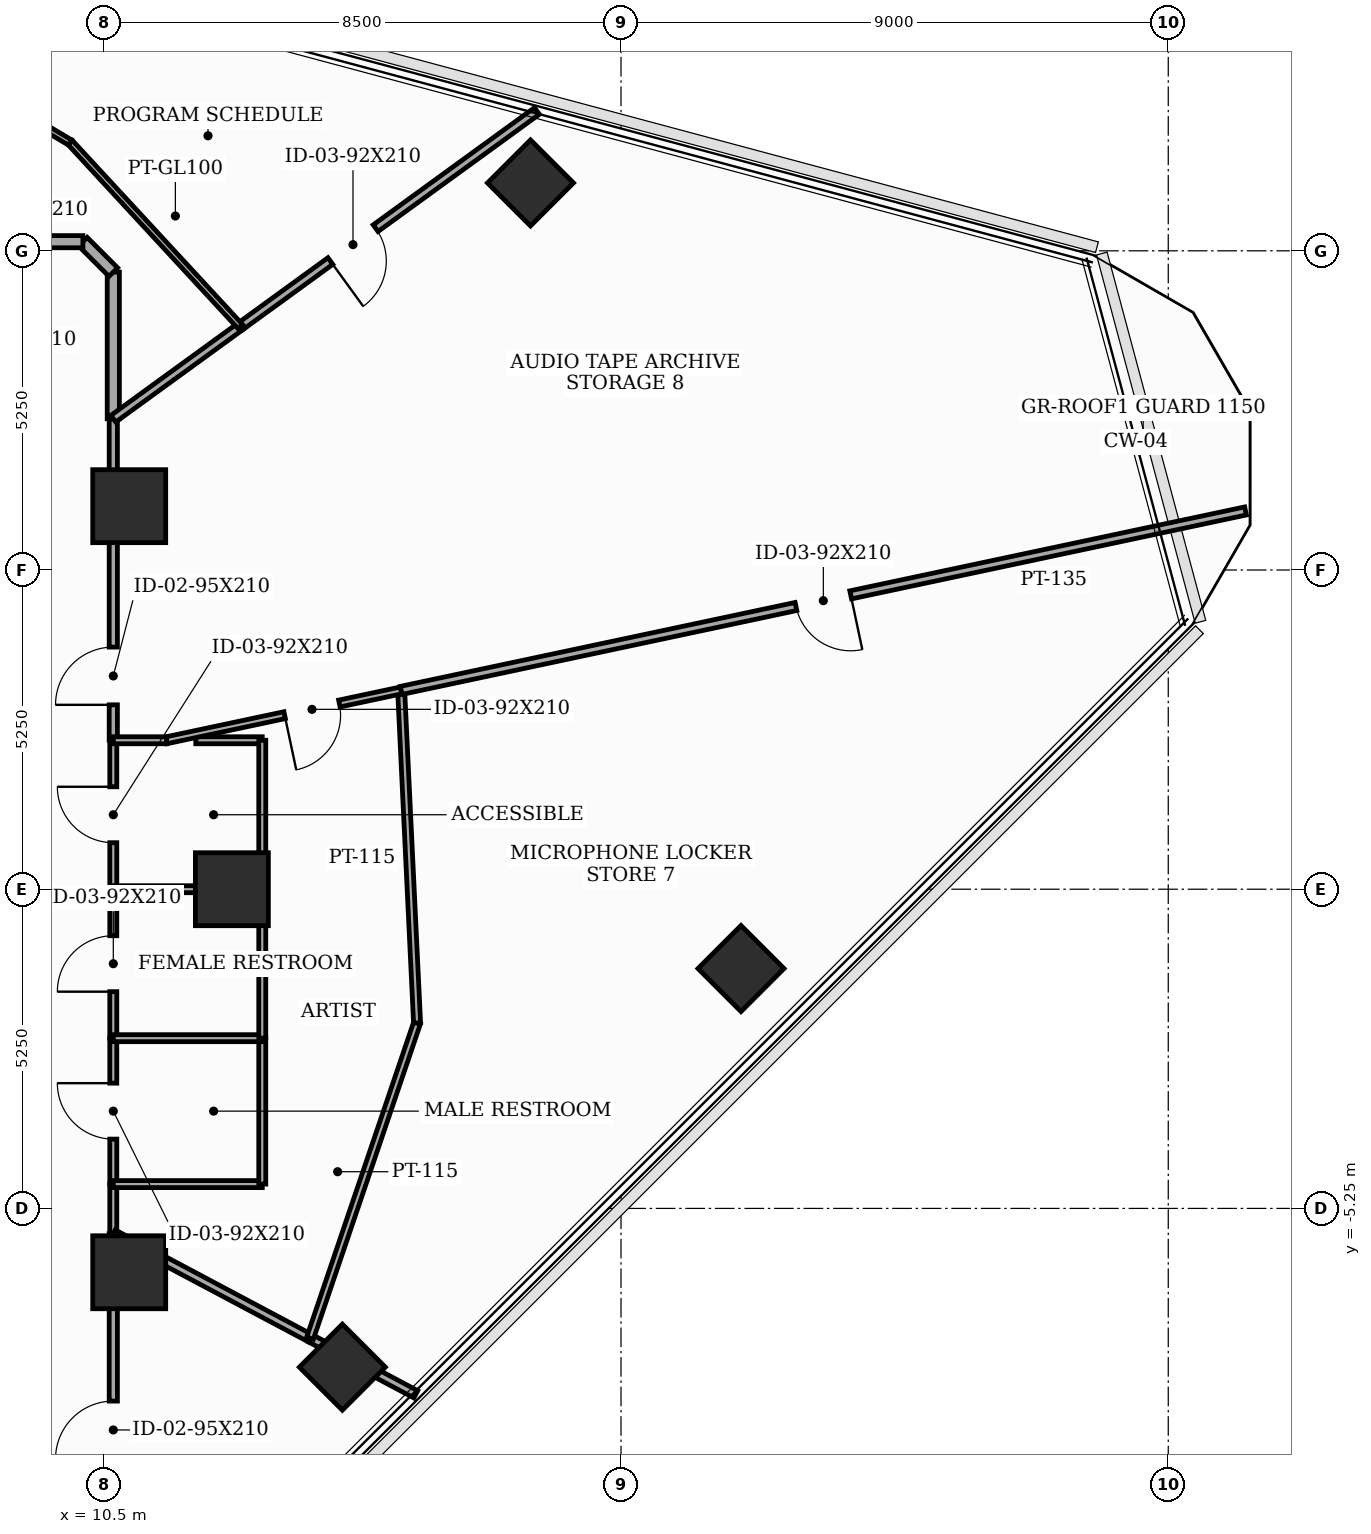
"""IFC4 building model, lengths in metres.
Left out: names, types, materials, properties, quantities, classifications, styles, units other than length and angle.
Written with IfcOpenShell. Run it as: python <this file> out.ifc"""

import sys

from ifc_helpers import new_model, si_unit, direction, frame, frame_2d, origin, origin_2d, place, context, subcontext, project, spatial, rectangle, extrude, element, fill, save


model = new_model("IFC4")
c1 = context("Model", 3, precision=1e-05, world=origin(), true_north=direction((0.0, 1.0)))
c2 = subcontext(c1, "Body", "Model", "MODEL_VIEW")
j1 = project(units=[si_unit("LENGTHUNIT", "METRE"), si_unit("PLANEANGLEUNIT", "RADIAN")], contexts=[c1])
p1 = place(None, origin())
s1 = spatial("IfcSite", under=j1, at=p1, CompositionType="ELEMENT")
p2 = place(p1, origin())
s2 = spatial("IfcBuilding", under=s1, at=p2, CompositionType="ELEMENT")
p3 = place(p2, frame((0.0, 0.0, 184.2)))
s3 = spatial("IfcBuildingStorey", under=s2, at=p3, CompositionType="ELEMENT", Elevation=184.2)
for number, where, z_axis, x_axis in (
    (1, (12.6, 0.0, 0.0), (0.0, 0.0, 1.0), (1.0, 0.0, 0.0)),
    (2, (10.912, 6.3, 0.0), (0.0, 0.0, 1.0), (1.0, 0.0, 0.0)),
    (3, (10.912, -6.3, 0.0), (0.0, 0.0, 1.0), (1.0, 0.0, 0.0)),
):
    element("IfcColumn", number, at=place(p3, frame(where, z_axis=z_axis, x_axis=x_axis)), inside=s3, PredefinedType="COLUMN", context=c2, shape_type="SweptSolid", body=[
        extrude(rectangle(XDim=1.2, YDim=1.2, at=origin_2d()), origin(), (0.0, 0.0, 1.0), 3.7),
    ])
for number, where, z_axis, x_axis in (
    (4, (14.417, -7.861, 0.0), (0.0, 0.0, 1.0), (0.707, 0.707, 0.0)),
    (5, (20.973, -1.305, 0.0), (0.0, 0.0, 1.0), (0.707, 0.707, 0.0)),
    (6, (17.511, 11.616, 0.0), (0.0, 0.0, 1.0), (0.707, 0.707, 0.0)),
):
    element("IfcColumn", number, at=place(p3, frame(where, z_axis=z_axis, x_axis=x_axis)), inside=s3, PredefinedType="COLUMN", context=c2, shape_type="SweptSolid", body=[
        extrude(rectangle(XDim=1.0, YDim=1.0, at=origin_2d()), origin(), (0.0, 0.0, 1.0), 3.7),
    ])
p4 = place(p3, frame((10.65, -10.15, 0.0), z_axis=(0.0, 0.0, 1.0), x_axis=(0.0, 1.0, 0.0)))
e7 = element("IfcWall", 7, at=p4, inside=s3, PredefinedType="PARTITIONING", context=c2, shape_type="SweptSolid", body=[
    extrude(rectangle(XDim=4.487, YDim=0.135, at=frame_2d((2.243, 0.0))), origin(), (0.0, 0.0, 1.0), 2.885),
])
p5 = place(p4, frame((0.781, 0.0, 0.0)))
e8 = element("IfcOpeningElement", 8, at=p5, cuts=e7, PredefinedType="OPENING", context=c2, shape_type="SweptSolid", body=[
    extrude(rectangle(XDim=0.95, YDim=2.1, at=frame_2d((0.475, 1.05))), frame((0.0, 0.077, 0.0), z_axis=(0.0, -1.0, 0.0), x_axis=(1.0, 0.0, 0.0)), (0.0, 0.0, 1.0), 0.155),
])
p6 = place(p3, frame((10.65, -4.85, 0.0), z_axis=(0.0, 0.0, 1.0), x_axis=(0.0, 1.0, 0.0)))
e9 = element("IfcWall", 9, at=p6, inside=s3, PredefinedType="PARTITIONING", context=c2, shape_type="SweptSolid", body=[
    extrude(rectangle(XDim=2.4, YDim=0.115, at=frame_2d((1.2, 0.0))), origin(), (0.0, 0.0, 1.0), 3.5),
])
p7 = place(p6, frame((0.74, 0.0, 0.0)))
e10 = element("IfcOpeningElement", 10, at=p7, cuts=e9, PredefinedType="OPENING", context=c2, shape_type="SweptSolid", body=[
    extrude(rectangle(XDim=0.92, YDim=2.1, at=frame_2d((0.46, 1.05))), frame((0.0, 0.067, 0.0), z_axis=(0.0, -1.0, 0.0), x_axis=(1.0, 0.0, 0.0)), (0.0, 0.0, 1.0), 0.135),
])
p8 = place(p3, frame((10.65, -5.663, 0.0), z_axis=(0.0, 0.0, 1.0), x_axis=(0.0, 1.0, 0.0)))
e11 = element("IfcWall", 11, at=p8, inside=s3, PredefinedType="PARTITIONING", context=c2, shape_type="SweptSolid", body=[
    extrude(rectangle(XDim=0.813, YDim=0.115, at=frame_2d((0.406, 0.0))), origin(), (0.0, 0.0, 1.0), 3.5),
])
p9 = place(p3, frame((10.65, -2.45, 0.0), z_axis=(0.0, 0.0, 1.0), x_axis=(0.0, 1.0, 0.0)))
e12 = element("IfcWall", 12, at=p9, inside=s3, PredefinedType="PARTITIONING", context=c2, shape_type="SweptSolid", body=[
    extrude(rectangle(XDim=2.45, YDim=0.115, at=frame_2d((1.225, 0.0))), origin(), (0.0, 0.0, 1.0), 2.885),
])
p10 = place(p9, frame((0.765, 0.0, 0.0)))
e13 = element("IfcOpeningElement", 13, at=p10, cuts=e12, PredefinedType="OPENING", context=c2, shape_type="SweptSolid", body=[
    extrude(rectangle(XDim=0.92, YDim=2.1, at=frame_2d((0.46, 1.05))), frame((0.0, 0.067, 0.0), z_axis=(0.0, -1.0, 0.0), x_axis=(1.0, 0.0, 0.0)), (0.0, 0.0, 1.0), 0.135),
])
p11 = place(p3, frame((10.65, 0.0, 0.0), z_axis=(0.0, 0.0, 1.0), x_axis=(0.0, 1.0, 0.0)))
e14 = element("IfcWall", 14, at=p11, inside=s3, PredefinedType="PARTITIONING", context=c2, shape_type="SweptSolid", body=[
    extrude(rectangle(XDim=2.45, YDim=0.115, at=frame_2d((1.225, 0.0))), origin(), (0.0, 0.0, 1.0), 2.885),
])
p12 = place(p11, frame((0.765, 0.0, 0.0)))
e15 = element("IfcOpeningElement", 15, at=p12, cuts=e14, PredefinedType="OPENING", context=c2, shape_type="SweptSolid", body=[
    extrude(rectangle(XDim=0.92, YDim=2.1, at=frame_2d((0.46, 1.05))), frame((0.0, 0.067, 0.0), z_axis=(0.0, -1.0, 0.0), x_axis=(1.0, 0.0, 0.0)), (0.0, 0.0, 1.0), 0.135),
])
p13 = place(p3, frame((10.65, 2.45, 0.0), z_axis=(0.0, 0.0, 1.0), x_axis=(0.0, 1.0, 0.0)))
e16 = element("IfcWall", 16, at=p13, inside=s3, PredefinedType="PARTITIONING", context=c2, shape_type="SweptSolid", body=[
    extrude(rectangle(XDim=5.288, YDim=0.135, at=frame_2d((2.644, 0.0))), origin(), (0.0, 0.0, 1.0), 2.885),
])
p14 = place(p13, frame((0.583, 0.0, 0.0)))
e17 = element("IfcOpeningElement", 17, at=p14, cuts=e16, PredefinedType="OPENING", context=c2, shape_type="SweptSolid", body=[
    extrude(rectangle(XDim=0.95, YDim=2.1, at=frame_2d((0.475, 1.05))), frame((0.0, 0.077, 0.0), z_axis=(0.0, -1.0, 0.0), x_axis=(1.0, 0.0, 0.0)), (0.0, 0.0, 1.0), 0.155),
])
p15 = place(p3, frame((10.65, 7.738, 0.0), z_axis=(0.0, 0.0, 1.0), x_axis=(0.0, 1.0, 0.0)))
e18 = element("IfcWall", 18, at=p15, inside=s3, PredefinedType="SOLIDWALL", context=c2, shape_type="SweptSolid", body=[
    extrude(rectangle(XDim=2.412, YDim=0.2, at=frame_2d((1.206, 0.0))), origin(), (0.0, 0.0, 1.0), 3.5),
])
p16 = place(p3, frame((10.65, 10.15, 0.0), z_axis=(0.0, 0.0, 1.0), x_axis=(-0.707106781187, 0.707106781187, 0.0)))
e19 = element("IfcWall", 19, at=p16, inside=s3, PredefinedType="SOLIDWALL", context=c2, shape_type="SweptSolid", body=[
    extrude(rectangle(XDim=0.707, YDim=0.2, at=frame_2d((0.354, 0.0))), origin(), (0.0, 0.0, 1.0), 3.5),
])
p17 = place(p3, frame((10.15, 10.65, 0.0), z_axis=(0.0, 0.0, 1.0), x_axis=(-1.0, 0.0, 0.0)))
e20 = element("IfcWall", 20, at=p17, inside=s3, PredefinedType="SOLIDWALL", context=c2, shape_type="SweptSolid", body=[
    extrude(rectangle(XDim=5.408, YDim=0.2, at=frame_2d((2.704, 0.0))), origin(), (0.0, 0.0, 1.0), 2.885),
])
p18 = place(p17, frame((0.607, 0.0, 0.0)))
e21 = element("IfcOpeningElement", 21, at=p18, cuts=e20, PredefinedType="OPENING", context=c2, shape_type="SweptSolid", body=[
    extrude(rectangle(XDim=0.95, YDim=2.1, at=frame_2d((0.475, 1.05))), frame((0.0, 0.11, 0.0), z_axis=(0.0, -1.0, 0.0), x_axis=(1.0, 0.0, 0.0)), (0.0, 0.0, 1.0), 0.22),
])
p19 = place(p3, frame((13.886, -7.383, 0.0), z_axis=(0.0, 0.0, 1.0), x_axis=(-0.88302513666, 0.469325695041, 0.0)))
e22 = element("IfcWall", 22, at=p19, inside=s3, PredefinedType="PARTITIONING", context=c2, shape_type="SweptSolid", body=[
    extrude(rectangle(XDim=3.665, YDim=0.135, at=frame_2d((1.833, 0.0))), origin(), (0.0, 0.0, 1.0), 2.885),
])
p20 = place(p3, frame((15.625, -8.308, 0.0), z_axis=(0.0, 0.0, 1.0), x_axis=(-0.882966413063, 0.469436165418, 0.0)))
e23 = element("IfcWall", 23, at=p20, inside=s3, PredefinedType="PARTITIONING", context=c2, shape_type="SweptSolid", body=[
    extrude(rectangle(XDim=1.969, YDim=0.135, at=frame_2d((0.985, 0.0))), origin(), (0.0, 0.0, 1.0), 2.985),
])
p21 = place(p3, frame((10.65, -4.85, 0.0), z_axis=(0.0, 0.0, 1.0), x_axis=(1.0, 0.0, 0.0)))
e24 = element("IfcWall", 24, at=p21, inside=s3, PredefinedType="PARTITIONING", context=c2, shape_type="SweptSolid", body=[
    extrude(rectangle(XDim=2.45, YDim=0.115, at=frame_2d((1.225, 0.0))), origin(), (0.0, 0.0, 1.0), 2.885),
])
p22 = place(p3, frame((13.1, -4.85, 0.0), z_axis=(0.0, 0.0, 1.0), x_axis=(0.0, 1.0, 0.0)))
e25 = element("IfcWall", 25, at=p22, inside=s3, PredefinedType="PARTITIONING", context=c2, shape_type="SweptSolid", body=[
    extrude(rectangle(XDim=2.4, YDim=0.115, at=frame_2d((1.2, 0.0))), origin(), (0.0, 0.0, 1.0), 3.5),
])
p23 = place(p3, frame((13.1, -2.45, 0.0), z_axis=(0.0, 0.0, 1.0), x_axis=(-1.0, 0.0, 0.0)))
e26 = element("IfcWall", 26, at=p23, inside=s3, PredefinedType="PARTITIONING", context=c2, shape_type="SweptSolid", body=[
    extrude(rectangle(XDim=2.45, YDim=0.115, at=frame_2d((1.225, 0.0))), origin(), (0.0, 0.0, 1.0), 2.885),
])
p24 = place(p3, frame((13.1, 0.0, 0.0), z_axis=(0.0, 0.0, 1.0), x_axis=(0.0, -1.0, 0.0)))
e27 = element("IfcWall", 27, at=p24, inside=s3, PredefinedType="PARTITIONING", context=c2, shape_type="SweptSolid", body=[
    extrude(rectangle(XDim=2.45, YDim=0.115, at=frame_2d((1.225, 0.0))), origin(), (0.0, 0.0, 1.0), 2.985),
])
p25 = place(p3, frame((13.886, -7.383, 0.0), z_axis=(0.0, 0.0, 1.0), x_axis=(0.321480582018, 0.946916171255, 0.0)))
e28 = element("IfcWall", 28, at=p25, inside=s3, PredefinedType="PARTITIONING", context=c2, shape_type="SweptSolid", body=[
    extrude(rectangle(XDim=5.475, YDim=0.115, at=frame_2d((2.737, 0.0))), origin(), (0.0, 0.0, 1.0), 3.5),
])
p26 = place(p3, frame((15.646, -2.199, 0.0), z_axis=(0.0, 0.0, 1.0), x_axis=(-0.047844791808, 0.998854782187, 0.0)))
e29 = element("IfcWall", 29, at=p26, inside=s3, PredefinedType="PARTITIONING", context=c2, shape_type="SweptSolid", body=[
    extrude(rectangle(XDim=5.475, YDim=0.115, at=frame_2d((2.738, 0.0))), origin(), (0.0, 0.0, 1.0), 2.985),
])
p27 = place(p3, frame((12.007, 2.45, 0.0), z_axis=(0.0, 0.0, 1.0), x_axis=(1.0, 0.0, 0.0)))
e30 = element("IfcWall", 30, at=p27, inside=s3, PredefinedType="PARTITIONING", context=c2, shape_type="SweptSolid", body=[
    extrude(rectangle(XDim=1.093, YDim=0.115, at=frame_2d((0.546, 0.0))), origin(), (0.0, 0.0, 1.0), 2.885),
])
p28 = place(p3, frame((13.1, 2.45, 0.0), z_axis=(0.0, 0.0, 1.0), x_axis=(0.0, -1.0, 0.0)))
e31 = element("IfcWall", 31, at=p28, inside=s3, PredefinedType="PARTITIONING", context=c2, shape_type="SweptSolid", body=[
    extrude(rectangle(XDim=2.45, YDim=0.115, at=frame_2d((1.225, 0.0))), origin(), (0.0, 0.0, 1.0), 2.985),
])
p29 = place(p3, frame((15.384, 3.27, 0.0), z_axis=(0.0, 0.0, 1.0), x_axis=(-0.978147995284, -0.207909834598, 0.0)))
e32 = element("IfcWall", 32, at=p29, inside=s3, PredefinedType="PARTITIONING", context=c2, shape_type="SweptSolid", body=[
    extrude(rectangle(XDim=3.944, YDim=0.115, at=frame_2d((1.972, 0.0))), origin(), (0.0, 0.0, 1.0), 2.885),
])
p30 = place(p29, frame((1.039, 0.0, 0.0)))
e33 = element("IfcOpeningElement", 33, at=p30, cuts=e32, PredefinedType="OPENING", context=c2, shape_type="SweptSolid", body=[
    extrude(rectangle(XDim=0.92, YDim=2.1, at=frame_2d((0.46, 1.05))), frame((0.0, 0.067, 0.0), z_axis=(0.0, -1.0, 0.0), x_axis=(1.0, 0.0, 0.0)), (0.0, 0.0, 1.0), 0.135),
])
p31 = place(p3, frame((13.1, 0.0, 0.0), z_axis=(0.0, 0.0, 1.0), x_axis=(-1.0, 0.0, 0.0)))
e34 = element("IfcWall", 34, at=p31, inside=s3, PredefinedType="PARTITIONING", context=c2, shape_type="SweptSolid", body=[
    extrude(rectangle(XDim=2.45, YDim=0.115, at=frame_2d((1.225, 0.0))), origin(), (0.0, 0.0, 1.0), 2.885),
])
p32 = place(p3, frame((29.271, 6.221, 0.0), z_axis=(0.0, 0.0, 1.0), x_axis=(-0.978151114267, -0.207895160259, 0.0)))
e35 = element("IfcWall", 35, at=p32, inside=s3, PredefinedType="PARTITIONING", context=c2, shape_type="SweptSolid", body=[
    extrude(rectangle(XDim=14.197, YDim=0.135, at=frame_2d((7.098, 0.0))), origin(), (0.0, 0.0, 1.0), 2.985),
])
p33 = place(p32, frame((6.638, 0.0, 0.0)))
e36 = element("IfcOpeningElement", 36, at=p33, cuts=e35, PredefinedType="OPENING", context=c2, shape_type="SweptSolid", body=[
    extrude(rectangle(XDim=0.92, YDim=2.1, at=frame_2d((0.46, 1.05))), frame((0.0, 0.077, 0.0), z_axis=(0.0, -1.0, 0.0), x_axis=(1.0, 0.0, 0.0)), (0.0, 0.0, 1.0), 0.155),
])
p34 = place(p3, frame((11.526, 2.45, 0.0), z_axis=(0.0, 0.0, 1.0), x_axis=(-1.0, 0.0, 0.0)))
e37 = element("IfcWall", 37, at=p34, inside=s3, PredefinedType="PARTITIONING", context=c2, shape_type="SweptSolid", body=[
    extrude(rectangle(XDim=0.876, YDim=0.115, at=frame_2d((0.438, 0.0))), origin(), (0.0, 0.0, 1.0), 3.5),
])
p35 = place(p3, frame((17.617, 12.8, 0.0), z_axis=(0.0, 0.0, 1.0), x_axis=(-0.809021342768, -0.587779267196, 0.0)))
e38 = element("IfcWall", 38, at=p35, inside=s3, PredefinedType="PARTITIONING", context=c2, shape_type="SweptSolid", body=[
    extrude(rectangle(XDim=6.031, YDim=0.135, at=frame_2d((3.015, 0.0))), origin(), (0.0, 0.0, 1.0), 2.985),
])
p36 = place(p35, frame((3.279, 0.0, 0.0)))
e39 = element("IfcOpeningElement", 39, at=p36, cuts=e38, PredefinedType="OPENING", context=c2, shape_type="SweptSolid", body=[
    extrude(rectangle(XDim=0.92, YDim=2.1, at=frame_2d((0.46, 1.05))), frame((0.0, 0.077, 0.0), z_axis=(0.0, -1.0, 0.0), x_axis=(1.0, 0.0, 0.0)), (0.0, 0.0, 1.0), 0.155),
])
p37 = place(p3, frame((12.738, 9.255, 0.0), z_axis=(0.0, 0.0, 1.0), x_axis=(-0.809067292609, -0.587716016483, 0.0)))
e40 = element("IfcWall", 40, at=p37, inside=s3, PredefinedType="PARTITIONING", context=c2, shape_type="SweptSolid", body=[
    extrude(rectangle(XDim=2.581, YDim=0.135, at=frame_2d((1.291, 0.0))), origin(), (0.0, 0.0, 1.0), 3.5),
])
p38 = place(p3, frame((6.404, 14.384, 0.0), z_axis=(0.0, 0.0, 1.0), x_axis=(0.859464079119, -0.511196143085, 0.0)))
e41 = element("IfcWall", 41, at=p38, inside=s3, PredefinedType="MOVABLE", context=c2, shape_type="SweptSolid", body=[
    extrude(rectangle(XDim=4.118, YDim=0.1, at=frame_2d((2.059, 0.0))), origin(), (0.0, 0.0, 1.0), 2.985),
])
p39 = place(p3, frame((9.943, 12.279, 0.0), z_axis=(0.0, 0.0, 1.0), x_axis=(0.678723214903, -0.734394170423, 0.0)))
e42 = element("IfcWall", 42, at=p39, inside=s3, PredefinedType="MOVABLE", context=c2, shape_type="SweptSolid", body=[
    extrude(rectangle(XDim=4.118, YDim=0.1, at=frame_2d((2.059, 0.0))), origin(), (0.0, 0.0, 1.0), 3.5),
])
p40 = place(p5, origin())
e43 = element("IfcDoor", 43, at=p40, inside=s3, OperationType="SINGLE_SWING_LEFT", PredefinedType="DOOR", context=c2, shape_type="SweptSolid", body=[
    extrude(rectangle(XDim=0.95, YDim=2.1, at=frame_2d((0.475, 1.05))), frame((0.0, 0.025, 0.0), z_axis=(0.0, -1.0, 0.0), x_axis=(1.0, 0.0, 0.0)), (0.0, 0.0, 1.0), 0.05),
])
fill(e8, e43)
p41 = place(p7, origin())
e44 = element("IfcDoor", 44, at=p41, inside=s3, OperationType="SINGLE_SWING_RIGHT", PredefinedType="DOOR", context=c2, shape_type="SweptSolid", body=[
    extrude(rectangle(XDim=0.92, YDim=2.1, at=frame_2d((0.46, 1.05))), frame((0.0, 0.025, 0.0), z_axis=(0.0, -1.0, 0.0), x_axis=(1.0, 0.0, 0.0)), (0.0, 0.0, 1.0), 0.05),
])
fill(e10, e44)
p42 = place(p10, origin())
e45 = element("IfcDoor", 45, at=p42, inside=s3, OperationType="SINGLE_SWING_LEFT", PredefinedType="DOOR", context=c2, shape_type="SweptSolid", body=[
    extrude(rectangle(XDim=0.92, YDim=2.1, at=frame_2d((0.46, 1.05))), frame((0.0, 0.025, 0.0), z_axis=(0.0, -1.0, 0.0), x_axis=(1.0, 0.0, 0.0)), (0.0, 0.0, 1.0), 0.05),
])
fill(e13, e45)
p43 = place(p12, origin())
e46 = element("IfcDoor", 46, at=p43, inside=s3, OperationType="SINGLE_SWING_RIGHT", PredefinedType="DOOR", context=c2, shape_type="SweptSolid", body=[
    extrude(rectangle(XDim=0.92, YDim=2.1, at=frame_2d((0.46, 1.05))), frame((0.0, 0.025, 0.0), z_axis=(0.0, -1.0, 0.0), x_axis=(1.0, 0.0, 0.0)), (0.0, 0.0, 1.0), 0.05),
])
fill(e15, e46)
p44 = place(p14, origin())
e47 = element("IfcDoor", 47, at=p44, inside=s3, OperationType="SINGLE_SWING_LEFT", PredefinedType="DOOR", context=c2, shape_type="SweptSolid", body=[
    extrude(rectangle(XDim=0.95, YDim=2.1, at=frame_2d((0.475, 1.05))), frame((0.0, 0.025, 0.0), z_axis=(0.0, -1.0, 0.0), x_axis=(1.0, 0.0, 0.0)), (0.0, 0.0, 1.0), 0.05),
])
fill(e17, e47)
p45 = place(p30, origin())
e48 = element("IfcDoor", 48, at=p45, inside=s3, OperationType="SINGLE_SWING_RIGHT", PredefinedType="DOOR", context=c2, shape_type="SweptSolid", body=[
    extrude(rectangle(XDim=0.92, YDim=2.1, at=frame_2d((0.46, 1.05))), frame((0.0, 0.025, 0.0), z_axis=(0.0, -1.0, 0.0), x_axis=(1.0, 0.0, 0.0)), (0.0, 0.0, 1.0), 0.05),
])
fill(e33, e48)
p46 = place(p33, origin())
e49 = element("IfcDoor", 49, at=p46, inside=s3, OperationType="SINGLE_SWING_LEFT", PredefinedType="DOOR", context=c2, shape_type="SweptSolid", body=[
    extrude(rectangle(XDim=0.92, YDim=2.1, at=frame_2d((0.46, 1.05))), frame((0.0, 0.025, 0.0), z_axis=(0.0, -1.0, 0.0), x_axis=(1.0, 0.0, 0.0)), (0.0, 0.0, 1.0), 0.05),
])
fill(e36, e49)
p47 = place(p36, origin())
e50 = element("IfcDoor", 50, at=p47, inside=s3, OperationType="SINGLE_SWING_RIGHT", PredefinedType="DOOR", context=c2, shape_type="SweptSolid", body=[
    extrude(rectangle(XDim=0.92, YDim=2.1, at=frame_2d((0.46, 1.05))), frame((0.0, 0.025, 0.0), z_axis=(0.0, -1.0, 0.0), x_axis=(1.0, 0.0, 0.0)), (0.0, 0.0, 1.0), 0.05),
])
fill(e39, e50)
save(model, sys.argv[1])
